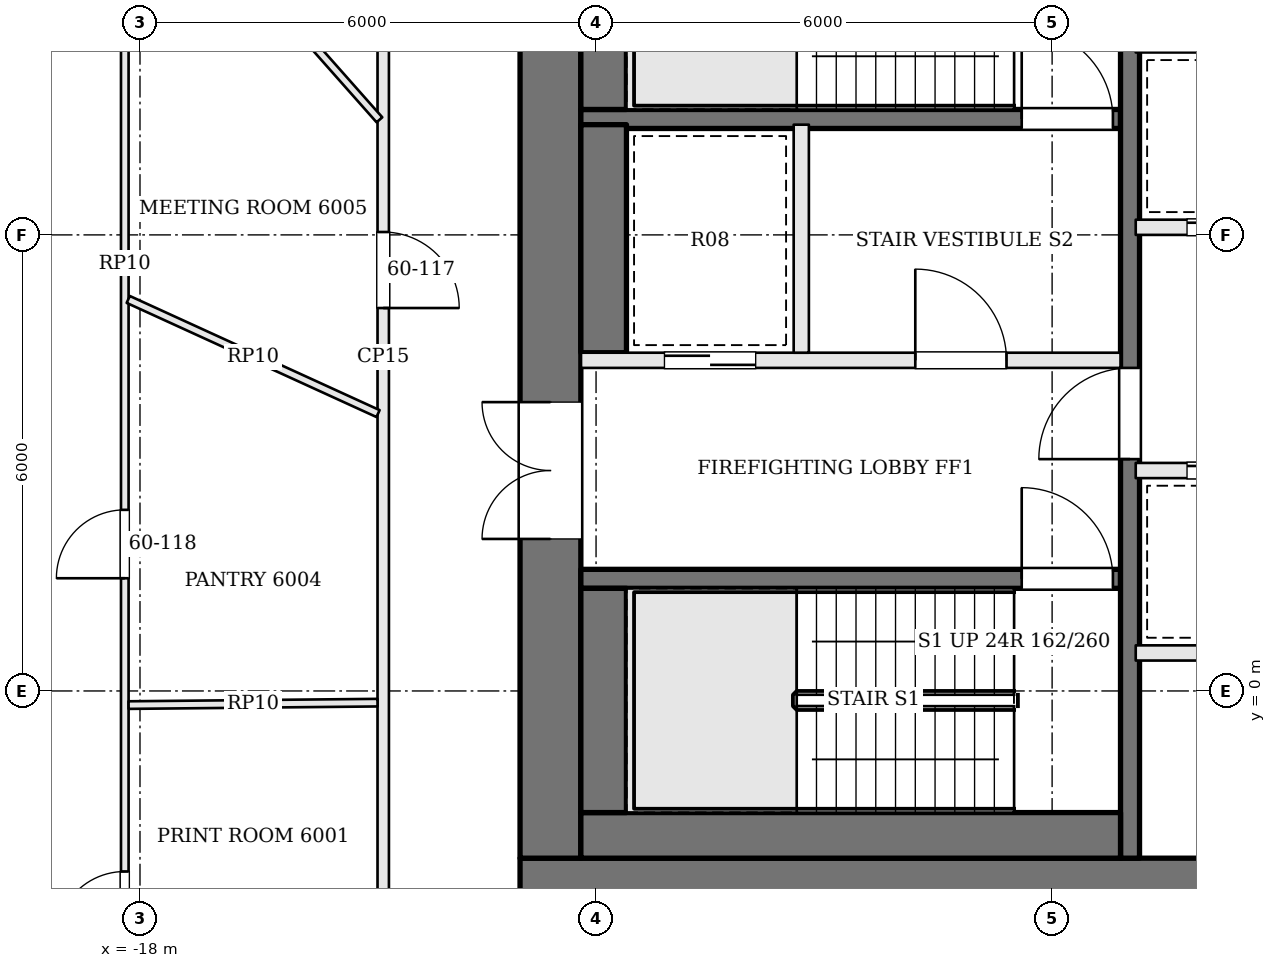
"""IFC4 building model, lengths in metres.
Left out: names, types, materials, properties, quantities, classifications, styles, units other than length and angle.
Written with IfcOpenShell. Run it as: python <this file> out.ifc"""

import sys

from ifc_helpers import new_model, si_unit, direction, frame, frame_2d, origin, place, context, subcontext, project, spatial, rectangle, extrude, element, fill, save


model = new_model("IFC4")
c1 = context("Model", 3, precision=1e-05, world=origin(), true_north=direction((0.0, 1.0)))
c2 = subcontext(c1, "Body", "Model", "MODEL_VIEW")
j1 = project(units=[si_unit("LENGTHUNIT", "METRE"), si_unit("PLANEANGLEUNIT", "RADIAN")], contexts=[c1])
p1 = place(None, origin())
s1 = spatial("IfcSite", under=j1, at=p1, CompositionType="ELEMENT")
p2 = place(p1, origin())
s2 = spatial("IfcBuilding", under=s1, at=p2, CompositionType="ELEMENT")
p3 = place(p2, frame((0.0, 0.0, 244.8)))
s3 = spatial("IfcBuildingStorey", under=s2, at=p3, CompositionType="ELEMENT", Elevation=244.8)
p4 = place(p3, frame((-13.0, -2.6, 0.0), z_axis=(0.0, 0.0, 1.0), x_axis=(1.0, 0.0, 0.0)))
e1 = element("IfcWall", 1, at=p4, inside=s3, PredefinedType="SHEAR", context=c2, shape_type="SweptSolid", body=[
    extrude(rectangle(XDim=26.0, YDim=0.8, at=frame_2d((13.0, 0.0))), origin(), (0.0, 0.0, 1.0), 3.9),
])
p5 = place(p4, frame((8.925, 0.0, 0.0)))
e2 = element("IfcOpeningElement", 2, at=p5, cuts=e1, PredefinedType="OPENING", context=c2, shape_type="SweptSolid", body=[
    extrude(rectangle(XDim=0.9, YDim=2.1, at=frame_2d((0.45, 1.05))), frame((0.0, 0.41, 0.0), z_axis=(0.0, -1.0, 0.0), x_axis=(1.0, 0.0, 0.0)), (0.0, 0.0, 1.0), 0.82),
])
p6 = place(p4, frame((11.475, 0.0, 0.0)))
e3 = element("IfcOpeningElement", 3, at=p6, cuts=e1, PredefinedType="OPENING", context=c2, shape_type="SweptSolid", body=[
    extrude(rectangle(XDim=0.9, YDim=2.1, at=frame_2d((0.45, 1.05))), frame((0.0, 0.41, 0.0), z_axis=(0.0, -1.0, 0.0), x_axis=(1.0, 0.0, 0.0)), (0.0, 0.0, 1.0), 0.82),
])
p7 = place(p4, frame((13.6, 0.0, 0.0)))
e4 = element("IfcOpeningElement", 4, at=p7, cuts=e1, PredefinedType="OPENING", context=c2, shape_type="SweptSolid", body=[
    extrude(rectangle(XDim=1.0, YDim=2.1, at=frame_2d((0.5, 1.05))), frame((0.0, 0.41, 0.0), z_axis=(0.0, -1.0, 0.0), x_axis=(1.0, 0.0, 0.0)), (0.0, 0.0, 1.0), 0.82),
])
p8 = place(p4, frame((15.95, 0.0, 0.0)))
e5 = element("IfcOpeningElement", 5, at=p8, cuts=e1, PredefinedType="OPENING", context=c2, shape_type="SweptSolid", body=[
    extrude(rectangle(XDim=1.0, YDim=2.1, at=frame_2d((0.5, 1.05))), frame((0.0, 0.41, 0.0), z_axis=(0.0, -1.0, 0.0), x_axis=(1.0, 0.0, 0.0)), (0.0, 0.0, 1.0), 0.82),
])
p9 = place(p3, frame((-12.6, -2.2, 0.0), z_axis=(0.0, 0.0, 1.0), x_axis=(0.0, 1.0, 0.0)))
e6 = element("IfcWall", 6, at=p9, inside=s3, PredefinedType="SHEAR", context=c2, shape_type="SweptSolid", body=[
    extrude(rectangle(XDim=13.4, YDim=0.8, at=frame_2d((6.7, 0.0))), origin(), (0.0, 0.0, 1.0), 3.9),
])
p10 = place(p9, frame((4.2, 0.0, 0.0)))
e7 = element("IfcOpeningElement", 7, at=p10, cuts=e6, PredefinedType="OPENING", context=c2, shape_type="SweptSolid", body=[
    extrude(rectangle(XDim=1.8, YDim=2.1, at=frame_2d((0.9, 1.05))), frame((0.0, 0.41, 0.0), z_axis=(0.0, -1.0, 0.0), x_axis=(1.0, 0.0, 0.0)), (0.0, 0.0, 1.0), 0.82),
])
p11 = place(p3, frame((-12.2, 1.475, 0.0), z_axis=(0.0, 0.0, 1.0), x_axis=(1.0, 0.0, 0.0)))
e8 = element("IfcWall", 8, at=p11, inside=s3, PredefinedType="SOLIDWALL", context=c2, shape_type="SweptSolid", body=[
    extrude(rectangle(XDim=7.1, YDim=0.25, at=frame_2d((3.55, 0.0))), origin(), (0.0, 0.0, 1.0), 3.7),
])
p12 = place(p11, frame((5.8, 0.0, 0.0)))
e9 = element("IfcOpeningElement", 9, at=p12, cuts=e8, PredefinedType="OPENING", context=c2, shape_type="SweptSolid", body=[
    extrude(rectangle(XDim=1.2, YDim=2.1, at=frame_2d((0.6, 1.05))), frame((0.0, 0.135, 0.0), z_axis=(0.0, -1.0, 0.0), x_axis=(1.0, 0.0, 0.0)), (0.0, 0.0, 1.0), 0.27),
])
p13 = place(p3, frame((-12.2, 4.35, 0.0), z_axis=(0.0, 0.0, 1.0), x_axis=(1.0, 0.0, 0.0)))
e10 = element("IfcWall", 10, at=p13, inside=s3, PredefinedType="SOLIDWALL", context=c2, shape_type="SweptSolid", body=[
    extrude(rectangle(XDim=7.1, YDim=0.2, at=frame_2d((3.55, 0.0))), origin(), (0.0, 0.0, 1.0), 3.7),
])
p14 = place(p13, frame((4.4, 0.0, 0.0)))
e11 = element("IfcOpeningElement", 11, at=p14, cuts=e10, PredefinedType="OPENING", context=c2, shape_type="SweptSolid", body=[
    extrude(rectangle(XDim=1.2, YDim=2.1, at=frame_2d((0.6, 1.05))), frame((0.0, 0.11, 0.0), z_axis=(0.0, -1.0, 0.0), x_axis=(1.0, 0.0, 0.0)), (0.0, 0.0, 1.0), 0.22),
])
p15 = place(p13, frame((1.1, 0.0, 0.0)))
e12 = element("IfcOpeningElement", 12, at=p15, cuts=e10, PredefinedType="OPENING", context=c2, shape_type="SweptSolid", body=[
    extrude(rectangle(XDim=1.2, YDim=2.1, at=frame_2d((0.6, 1.05))), frame((0.0, 0.11, 0.0), z_axis=(0.0, -1.0, 0.0), x_axis=(1.0, 0.0, 0.0)), (0.0, 0.0, 1.0), 0.22),
])
p16 = place(p3, frame((-12.2, 7.525, 0.0), z_axis=(0.0, 0.0, 1.0), x_axis=(1.0, 0.0, 0.0)))
e13 = element("IfcWall", 13, at=p16, inside=s3, PredefinedType="SOLIDWALL", context=c2, shape_type="SweptSolid", body=[
    extrude(rectangle(XDim=7.1, YDim=0.25, at=frame_2d((3.55, 0.0))), origin(), (0.0, 0.0, 1.0), 3.7),
])
p17 = place(p16, frame((5.8, 0.0, 0.0)))
e14 = element("IfcOpeningElement", 14, at=p17, cuts=e13, PredefinedType="OPENING", context=c2, shape_type="SweptSolid", body=[
    extrude(rectangle(XDim=1.2, YDim=2.1, at=frame_2d((0.6, 1.05))), frame((0.0, 0.135, 0.0), z_axis=(0.0, -1.0, 0.0), x_axis=(1.0, 0.0, 0.0)), (0.0, 0.0, 1.0), 0.27),
])
p18 = place(p3, frame((-9.3, 4.45, 0.0), z_axis=(0.0, 0.0, 1.0), x_axis=(0.0, 1.0, 0.0)))
e15 = element("IfcWall", 15, at=p18, inside=s3, PredefinedType="SOLIDWALL", context=c2, shape_type="SweptSolid", body=[
    extrude(rectangle(XDim=3.0, YDim=0.2, at=frame_2d((1.5, 0.0))), origin(), (0.0, 0.0, 1.0), 3.7),
])
p19 = place(p3, frame((-4.975, -2.2, 0.0), z_axis=(0.0, 0.0, 1.0), x_axis=(0.0, 1.0, 0.0)))
e16 = element("IfcWall", 16, at=p19, inside=s3, PredefinedType="SOLIDWALL", context=c2, shape_type="SweptSolid", body=[
    extrude(rectangle(XDim=13.4, YDim=0.25, at=frame_2d((6.7, 0.0))), origin(), (0.0, 0.0, 1.0), 3.7),
])
p20 = place(p19, frame((5.25, 0.0, 0.0)))
e17 = element("IfcOpeningElement", 17, at=p20, cuts=e16, PredefinedType="OPENING", context=c2, shape_type="SweptSolid", body=[
    extrude(rectangle(XDim=1.2, YDim=2.1, at=frame_2d((0.6, 1.05))), frame((0.0, 0.135, 0.0), z_axis=(0.0, -1.0, 0.0), x_axis=(1.0, 0.0, 0.0)), (0.0, 0.0, 1.0), 0.27),
])
p21 = place(p3, frame((-12.2, -1.9, 0.0), z_axis=(0.0, 0.0, 1.0), x_axis=(1.0, 0.0, 0.0)))
e18 = element("IfcWall", 18, at=p21, inside=s3, PredefinedType="SOLIDWALL", context=c2, shape_type="SweptSolid", body=[
    extrude(rectangle(XDim=7.1, YDim=0.6, at=frame_2d((3.55, 0.0))), origin(), (0.0, 0.0, 1.0), 3.7),
])
p22 = place(p3, frame((-11.9, -1.6, 0.0), z_axis=(0.0, 0.0, 1.0), x_axis=(0.0, 1.0, 0.0)))
e19 = element("IfcWall", 19, at=p22, inside=s3, PredefinedType="SOLIDWALL", context=c2, shape_type="SweptSolid", body=[
    extrude(rectangle(XDim=2.95, YDim=0.6, at=frame_2d((1.475, 0.0))), origin(), (0.0, 0.0, 1.0), 3.7),
])
p23 = place(p3, frame((-11.9, 4.45, 0.0), z_axis=(0.0, 0.0, 1.0), x_axis=(0.0, 1.0, 0.0)))
e20 = element("IfcWall", 20, at=p23, inside=s3, PredefinedType="SOLIDWALL", context=c2, shape_type="SweptSolid", body=[
    extrude(rectangle(XDim=3.0, YDim=0.6, at=frame_2d((1.5, 0.0))), origin(), (0.0, 0.0, 1.0), 3.7),
])
p24 = place(p3, frame((-11.9, 7.65, 0.0), z_axis=(0.0, 0.0, 1.0), x_axis=(0.0, 1.0, 0.0)))
e21 = element("IfcWall", 21, at=p24, inside=s3, PredefinedType="SOLIDWALL", context=c2, shape_type="SweptSolid", body=[
    extrude(rectangle(XDim=2.95, YDim=0.6, at=frame_2d((1.475, 0.0))), origin(), (0.0, 0.0, 1.0), 3.7),
])
p25 = place(p3, frame((-4.9, 0.5, 0.0), z_axis=(0.0, 0.0, 1.0), x_axis=(1.0, 0.0, 0.0)))
e22 = element("IfcWall", 22, at=p25, inside=s3, PredefinedType="SOLIDWALL", context=c2, shape_type="SweptSolid", body=[
    extrude(rectangle(XDim=9.8, YDim=0.2, at=frame_2d((4.9, 0.0))), origin(), (0.0, 0.0, 1.0), 3.7),
])
p26 = place(p3, frame((-4.9, 2.9, 0.0), z_axis=(0.0, 0.0, 1.0), x_axis=(1.0, 0.0, 0.0)))
e23 = element("IfcWall", 23, at=p26, inside=s3, PredefinedType="SOLIDWALL", context=c2, shape_type="SweptSolid", body=[
    extrude(rectangle(XDim=9.8, YDim=0.2, at=frame_2d((4.9, 0.0))), origin(), (0.0, 0.0, 1.0), 3.7),
])
p27 = place(p26, frame((0.675, 0.0, 0.0)))
e24 = element("IfcOpeningElement", 24, at=p27, cuts=e23, PredefinedType="OPENING", context=c2, shape_type="SweptSolid", body=[
    extrude(rectangle(XDim=1.1, YDim=2.1, at=frame_2d((0.55, 1.05))), frame((0.0, 0.11, 0.0), z_axis=(0.0, -1.0, 0.0), x_axis=(1.0, 0.0, 0.0)), (0.0, 0.0, 1.0), 0.22),
])
p28 = place(p26, frame((2.613, 0.0, 0.0)))
e25 = element("IfcOpeningElement", 25, at=p28, cuts=e23, PredefinedType="OPENING", context=c2, shape_type="SweptSolid", body=[
    extrude(rectangle(XDim=0.9, YDim=2.1, at=frame_2d((0.45, 1.05))), frame((0.0, 0.11, 0.0), z_axis=(0.0, -1.0, 0.0), x_axis=(1.0, 0.0, 0.0)), (0.0, 0.0, 1.0), 0.22),
])
p29 = place(p26, frame((4.35, 0.0, 0.0)))
e26 = element("IfcOpeningElement", 26, at=p29, cuts=e23, PredefinedType="OPENING", context=c2, shape_type="SweptSolid", body=[
    extrude(rectangle(XDim=1.1, YDim=2.1, at=frame_2d((0.55, 1.05))), frame((0.0, 0.11, 0.0), z_axis=(0.0, -1.0, 0.0), x_axis=(1.0, 0.0, 0.0)), (0.0, 0.0, 1.0), 0.22),
])
p30 = place(p26, frame((7.463, 0.0, 0.0)))
e27 = element("IfcOpeningElement", 27, at=p30, cuts=e23, PredefinedType="OPENING", context=c2, shape_type="SweptSolid", body=[
    extrude(rectangle(XDim=1.0, YDim=2.1, at=frame_2d((0.5, 1.05))), frame((0.0, 0.11, 0.0), z_axis=(0.0, -1.0, 0.0), x_axis=(1.0, 0.0, 0.0)), (0.0, 0.0, 1.0), 0.22),
])
p31 = place(p3, frame((-4.9, 6.1, 0.0), z_axis=(0.0, 0.0, 1.0), x_axis=(1.0, 0.0, 0.0)))
e28 = element("IfcWall", 28, at=p31, inside=s3, PredefinedType="SOLIDWALL", context=c2, shape_type="SweptSolid", body=[
    extrude(rectangle(XDim=9.8, YDim=0.2, at=frame_2d((4.9, 0.0))), origin(), (0.0, 0.0, 1.0), 3.7),
])
p32 = place(p31, frame((0.675, 0.0, 0.0)))
e29 = element("IfcOpeningElement", 29, at=p32, cuts=e28, PredefinedType="OPENING", context=c2, shape_type="SweptSolid", body=[
    extrude(rectangle(XDim=1.1, YDim=2.1, at=frame_2d((0.55, 1.05))), frame((0.0, 0.11, 0.0), z_axis=(0.0, -1.0, 0.0), x_axis=(1.0, 0.0, 0.0)), (0.0, 0.0, 1.0), 0.22),
])
p33 = place(p31, frame((3.125, 0.0, 0.0)))
e30 = element("IfcOpeningElement", 30, at=p33, cuts=e28, PredefinedType="OPENING", context=c2, shape_type="SweptSolid", body=[
    extrude(rectangle(XDim=1.1, YDim=2.1, at=frame_2d((0.55, 1.05))), frame((0.0, 0.11, 0.0), z_axis=(0.0, -1.0, 0.0), x_axis=(1.0, 0.0, 0.0)), (0.0, 0.0, 1.0), 0.22),
])
p34 = place(p31, frame((5.575, 0.0, 0.0)))
e31 = element("IfcOpeningElement", 31, at=p34, cuts=e28, PredefinedType="OPENING", context=c2, shape_type="SweptSolid", body=[
    extrude(rectangle(XDim=1.1, YDim=2.1, at=frame_2d((0.55, 1.05))), frame((0.0, 0.11, 0.0), z_axis=(0.0, -1.0, 0.0), x_axis=(1.0, 0.0, 0.0)), (0.0, 0.0, 1.0), 0.22),
])
p35 = place(p31, frame((8.025, 0.0, 0.0)))
e32 = element("IfcOpeningElement", 32, at=p35, cuts=e28, PredefinedType="OPENING", context=c2, shape_type="SweptSolid", body=[
    extrude(rectangle(XDim=1.1, YDim=2.1, at=frame_2d((0.55, 1.05))), frame((0.0, 0.11, 0.0), z_axis=(0.0, -1.0, 0.0), x_axis=(1.0, 0.0, 0.0)), (0.0, 0.0, 1.0), 0.22),
])
p36 = place(p3, frame((-14.8, 12.376, 0.0), z_axis=(0.0, 0.0, 1.0), x_axis=(0.0, -1.0, 0.0)))
e33 = element("IfcWall", 33, at=p36, inside=s3, PredefinedType="PARTITIONING", context=c2, shape_type="SweptSolid", body=[
    extrude(rectangle(XDim=15.958, YDim=0.15, at=frame_2d((7.979, 0.0))), origin(), (0.0, 0.0, 1.0), 3.084),
])
p37 = place(p36, frame((1.521, 0.0, 0.0)))
e34 = element("IfcOpeningElement", 34, at=p37, cuts=e33, PredefinedType="OPENING", context=c2, shape_type="SweptSolid", body=[
    extrude(rectangle(XDim=1.8, YDim=2.1, at=frame_2d((0.9, 1.05))), frame((0.0, 0.085, 0.0), z_axis=(0.0, -1.0, 0.0), x_axis=(1.0, 0.0, 0.0)), (0.0, 0.0, 1.0), 0.17),
])
p38 = place(p36, frame((6.338, 0.0, 0.0)))
e35 = element("IfcOpeningElement", 35, at=p38, cuts=e33, PredefinedType="OPENING", context=c2, shape_type="SweptSolid", body=[
    extrude(rectangle(XDim=1.0, YDim=2.4, at=frame_2d((0.5, 1.2))), frame((0.0, 0.085, 0.0), z_axis=(0.0, -1.0, 0.0), x_axis=(1.0, 0.0, 0.0)), (0.0, 0.0, 1.0), 0.17),
])
p39 = place(p3, frame((-18.2, -5.006, 0.0), z_axis=(0.0, 0.0, 1.0), x_axis=(0.0, 1.0, 0.0)))
e36 = element("IfcWall", 36, at=p39, inside=s3, PredefinedType="PARTITIONING", context=c2, shape_type="SweptSolid", body=[
    extrude(rectangle(XDim=21.26, YDim=0.1, at=frame_2d((10.63, 0.0))), origin(), (0.0, 0.0, 1.0), 3.084),
])
p40 = place(p39, frame((18.745, 0.0, 0.0)))
e37 = element("IfcOpeningElement", 37, at=p40, cuts=e36, PredefinedType="OPENING", context=c2, shape_type="SweptSolid", body=[
    extrude(rectangle(XDim=1.0, YDim=2.1, at=frame_2d((0.5, 1.05))), frame((0.0, 0.06, 0.0), z_axis=(0.0, -1.0, 0.0), x_axis=(1.0, 0.0, 0.0)), (0.0, 0.0, 1.0), 0.12),
])
p41 = place(p39, frame((6.489, 0.0, 0.0)))
e38 = element("IfcOpeningElement", 38, at=p41, cuts=e36, PredefinedType="OPENING", context=c2, shape_type="SweptSolid", body=[
    extrude(rectangle(XDim=0.9, YDim=2.1, at=frame_2d((0.45, 1.05))), frame((0.0, 0.06, 0.0), z_axis=(0.0, -1.0, 0.0), x_axis=(1.0, 0.0, 0.0)), (0.0, 0.0, 1.0), 0.12),
])
p42 = place(p39, frame((1.731, 0.0, 0.0)))
e39 = element("IfcOpeningElement", 39, at=p42, cuts=e36, PredefinedType="OPENING", context=c2, shape_type="SweptSolid", body=[
    extrude(rectangle(XDim=0.9, YDim=2.1, at=frame_2d((0.45, 1.05))), frame((0.0, 0.06, 0.0), z_axis=(0.0, -1.0, 0.0), x_axis=(1.0, 0.0, 0.0)), (0.0, 0.0, 1.0), 0.12),
])
p43 = place(p3, frame((-14.85, 7.514, 0.0), z_axis=(0.0, 0.0, 1.0), x_axis=(-0.663136045348, 0.748498888015, 0.0)))
e40 = element("IfcWall", 40, at=p43, inside=s3, PredefinedType="PARTITIONING", context=c2, shape_type="SweptSolid", body=[
    extrude(rectangle(XDim=5.002, YDim=0.1, at=frame_2d((2.501, 0.0))), origin(), (0.0, 0.0, 1.0), 3.084),
])
p44 = place(p3, frame((-14.868, 3.649, 0.0), z_axis=(0.0, 0.0, 1.0), x_axis=(-0.909566433152, 0.41555854423, 0.0)))
e41 = element("IfcWall", 41, at=p44, inside=s3, PredefinedType="PARTITIONING", context=c2, shape_type="SweptSolid", body=[
    extrude(rectangle(XDim=3.613, YDim=0.1, at=frame_2d((1.807, 0.0))), origin(), (0.0, 0.0, 1.0), 3.084),
])
p45 = place(p3, frame((-14.875, -0.154, 0.0), z_axis=(0.0, 0.0, 1.0), x_axis=(-0.999952316851, -0.009765450537, 0.0)))
e42 = element("IfcWall", 42, at=p45, inside=s3, PredefinedType="PARTITIONING", context=c2, shape_type="SweptSolid", body=[
    extrude(rectangle(XDim=3.275, YDim=0.1, at=frame_2d((1.638, 0.0))), origin(), (0.0, 0.0, 1.0), 3.084),
])
p46 = place(p10, origin())
e43 = element("IfcDoor", 43, at=p46, inside=s3, OperationType="DOUBLE_DOOR_SINGLE_SWING", PredefinedType="DOOR", context=c2, shape_type="SweptSolid", body=[
    extrude(rectangle(XDim=1.8, YDim=2.1, at=frame_2d((0.9, 1.05))), frame((0.0, 0.025, 0.0), z_axis=(0.0, -1.0, 0.0), x_axis=(1.0, 0.0, 0.0)), (0.0, 0.0, 1.0), 0.05),
])
fill(e7, e43)
p47 = place(p20, origin())
e44 = element("IfcDoor", 44, at=p47, inside=s3, OperationType="SINGLE_SWING_LEFT", PredefinedType="DOOR", context=c2, shape_type="SweptSolid", body=[
    extrude(rectangle(XDim=1.2, YDim=2.1, at=frame_2d((0.6, 1.05))), frame((0.0, 0.025, 0.0), z_axis=(0.0, -1.0, 0.0), x_axis=(1.0, 0.0, 0.0)), (0.0, 0.0, 1.0), 0.05),
])
fill(e17, e44)
p48 = place(p14, origin())
e45 = element("IfcDoor", 45, at=p48, inside=s3, OperationType="SINGLE_SWING_LEFT", PredefinedType="DOOR", context=c2, shape_type="SweptSolid", body=[
    extrude(rectangle(XDim=1.2, YDim=2.1, at=frame_2d((0.6, 1.05))), frame((0.0, 0.025, 0.0), z_axis=(0.0, -1.0, 0.0), x_axis=(1.0, 0.0, 0.0)), (0.0, 0.0, 1.0), 0.05),
])
fill(e11, e45)
p49 = place(p12, origin())
e46 = element("IfcDoor", 46, at=p49, inside=s3, OperationType="SINGLE_SWING_LEFT", PredefinedType="DOOR", context=c2, shape_type="SweptSolid", body=[
    extrude(rectangle(XDim=1.2, YDim=2.1, at=frame_2d((0.6, 1.05))), frame((0.0, 0.025, 0.0), z_axis=(0.0, -1.0, 0.0), x_axis=(1.0, 0.0, 0.0)), (0.0, 0.0, 1.0), 0.05),
])
fill(e9, e46)
p50 = place(p17, origin())
e47 = element("IfcDoor", 47, at=p50, inside=s3, OperationType="SINGLE_SWING_LEFT", PredefinedType="DOOR", context=c2, shape_type="SweptSolid", body=[
    extrude(rectangle(XDim=1.2, YDim=2.1, at=frame_2d((0.6, 1.05))), frame((0.0, 0.025, 0.0), z_axis=(0.0, -1.0, 0.0), x_axis=(1.0, 0.0, 0.0)), (0.0, 0.0, 1.0), 0.05),
])
fill(e14, e47)
p51 = place(p15, origin())
e48 = element("IfcDoor", 48, at=p51, inside=s3, OperationType="SLIDING_TO_RIGHT", PredefinedType="DOOR", context=c2, shape_type="SweptSolid", body=[
    extrude(rectangle(XDim=1.2, YDim=2.1, at=frame_2d((0.6, 1.05))), frame((0.0, 0.025, 0.0), z_axis=(0.0, -1.0, 0.0), x_axis=(1.0, 0.0, 0.0)), (0.0, 0.0, 1.0), 0.05),
])
fill(e12, e48)
p52 = place(p27, origin())
e49 = element("IfcDoor", 49, at=p52, inside=s3, OperationType="SLIDING_TO_RIGHT", PredefinedType="DOOR", context=c2, shape_type="SweptSolid", body=[
    extrude(rectangle(XDim=1.1, YDim=2.1, at=frame_2d((0.55, 1.05))), frame((0.0, 0.025, 0.0), z_axis=(0.0, -1.0, 0.0), x_axis=(1.0, 0.0, 0.0)), (0.0, 0.0, 1.0), 0.05),
])
fill(e24, e49)
p53 = place(p32, origin())
e50 = element("IfcDoor", 50, at=p53, inside=s3, OperationType="SLIDING_TO_RIGHT", PredefinedType="DOOR", context=c2, shape_type="SweptSolid", body=[
    extrude(rectangle(XDim=1.1, YDim=2.1, at=frame_2d((0.55, 1.05))), frame((0.0, 0.025, 0.0), z_axis=(0.0, -1.0, 0.0), x_axis=(1.0, 0.0, 0.0)), (0.0, 0.0, 1.0), 0.05),
])
fill(e29, e50)
p54 = place(p38, origin())
e51 = element("IfcDoor", 51, at=p54, inside=s3, OperationType="SINGLE_SWING_RIGHT", PredefinedType="DOOR", context=c2, shape_type="SweptSolid", body=[
    extrude(rectangle(XDim=1.0, YDim=2.4, at=frame_2d((0.5, 1.2))), frame((0.0, 0.025, 0.0), z_axis=(0.0, -1.0, 0.0), x_axis=(1.0, 0.0, 0.0)), (0.0, 0.0, 1.0), 0.05),
])
fill(e35, e51)
p55 = place(p41, origin())
e52 = element("IfcDoor", 52, at=p55, inside=s3, OperationType="SINGLE_SWING_LEFT", PredefinedType="DOOR", context=c2, shape_type="SweptSolid", body=[
    extrude(rectangle(XDim=0.9, YDim=2.1, at=frame_2d((0.45, 1.05))), frame((0.0, 0.025, 0.0), z_axis=(0.0, -1.0, 0.0), x_axis=(1.0, 0.0, 0.0)), (0.0, 0.0, 1.0), 0.05),
])
fill(e38, e52)
p56 = place(p42, origin())
e53 = element("IfcDoor", 53, at=p56, inside=s3, OperationType="SINGLE_SWING_LEFT", PredefinedType="DOOR", context=c2, shape_type="SweptSolid", body=[
    extrude(rectangle(XDim=0.9, YDim=2.1, at=frame_2d((0.45, 1.05))), frame((0.0, 0.025, 0.0), z_axis=(0.0, -1.0, 0.0), x_axis=(1.0, 0.0, 0.0)), (0.0, 0.0, 1.0), 0.05),
])
fill(e39, e53)
save(model, sys.argv[1])
